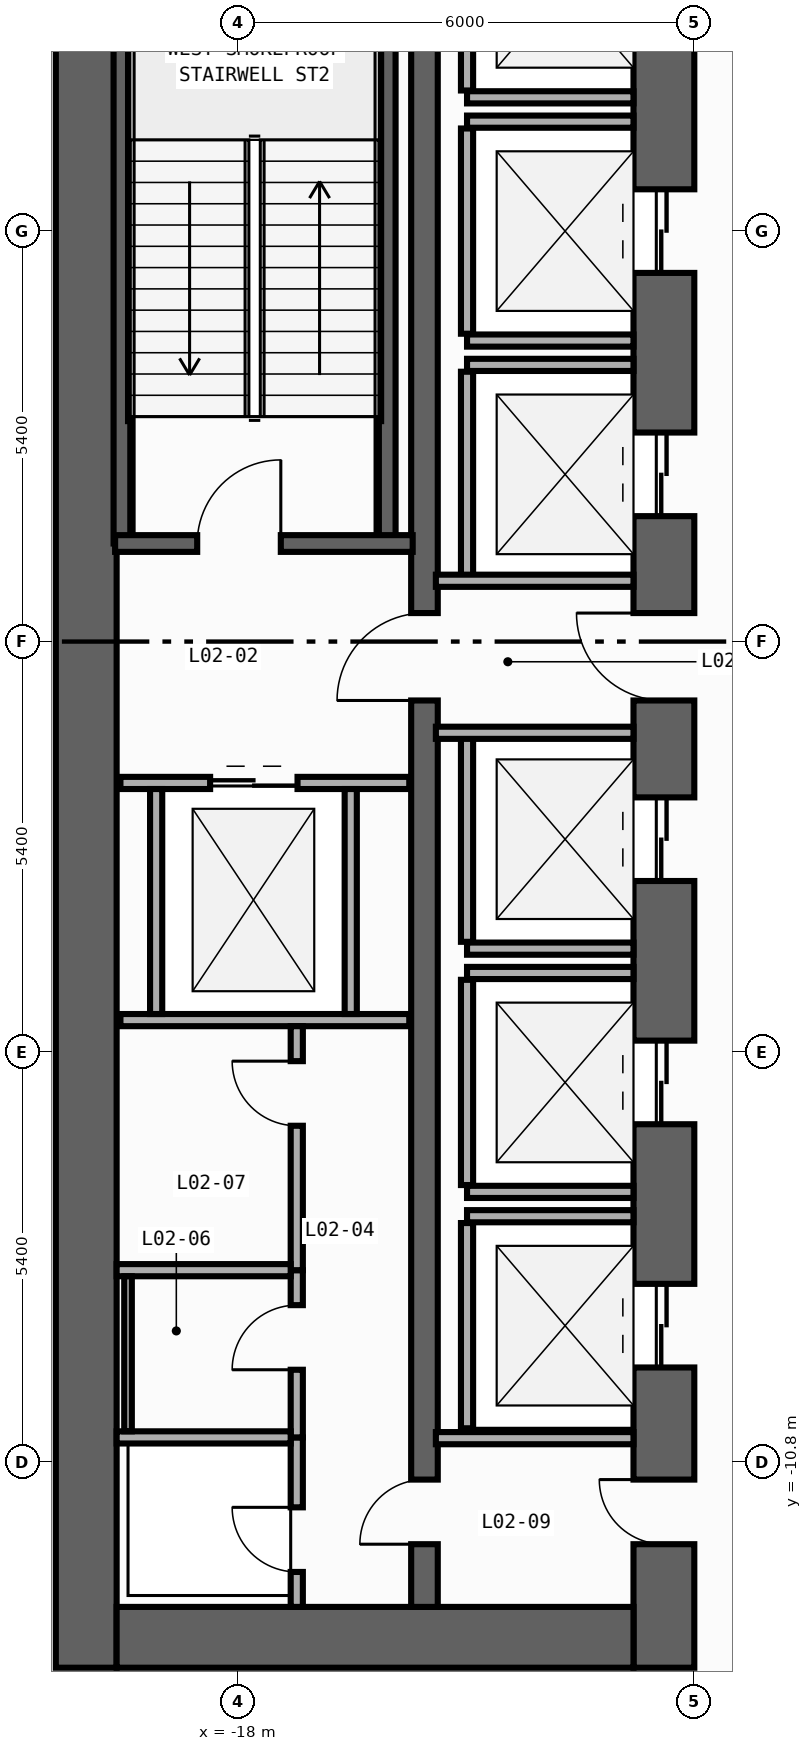
"""IFC4 building model, lengths in metres.
Left out: names, types, materials, properties, quantities, classifications, styles, units other than length and angle.
Written with IfcOpenShell. Run it as: python <this file> out.ifc"""

import sys

from ifc_helpers import new_model, si_unit, direction, frame, frame_2d, origin, place, context, subcontext, project, spatial, rectangle, extrude, element, fill, save


model = new_model("IFC4")
c1 = context("Model", 3, precision=1e-05, world=origin(), true_north=direction((0.0, 1.0)))
c2 = subcontext(c1, "Body", "Model", "MODEL_VIEW")
j1 = project(units=[si_unit("LENGTHUNIT", "METRE"), si_unit("PLANEANGLEUNIT", "RADIAN")], contexts=[c1])
p1 = place(None, origin())
s1 = spatial("IfcSite", under=j1, at=p1, CompositionType="ELEMENT")
p2 = place(p1, origin())
s2 = spatial("IfcBuilding", under=s1, at=p2, CompositionType="ELEMENT")
p3 = place(p2, frame((0.0, 0.0, 6.0)))
s3 = spatial("IfcBuildingStorey", under=s2, at=p3, CompositionType="ELEMENT", Elevation=6.0)
p4 = place(p3, frame((-20.0, -13.5, 0.0), z_axis=(0.0, 0.0, 1.0), x_axis=(0.0, 1.0, 0.0)))
e1 = element("IfcWall", 1, at=p4, inside=s3, PredefinedType="SHEAR", context=c2, shape_type="SweptSolid", body=[
    extrude(rectangle(XDim=27.0, YDim=0.8, at=frame_2d((13.5, 0.0))), origin(), (0.0, 0.0, 1.0), 4.7),
])
p5 = place(p3, frame((-12.4, -13.5, 0.0), z_axis=(0.0, 0.0, 1.0), x_axis=(0.0, 1.0, 0.0)))
e2 = element("IfcWall", 2, at=p5, inside=s3, PredefinedType="SHEAR", context=c2, shape_type="SweptSolid", body=[
    extrude(rectangle(XDim=27.0, YDim=0.8, at=frame_2d((13.5, 0.0))), origin(), (0.0, 0.0, 1.0), 4.7),
])
p6 = place(p5, frame((21.55, 0.0, 0.0)))
e3 = element("IfcOpeningElement", 3, at=p6, cuts=e2, PredefinedType="OPENING", context=c2, shape_type="SweptSolid", body=[
    extrude(rectangle(XDim=1.1, YDim=2.2, at=frame_2d((0.55, 1.1))), frame((0.0, 0.41, 0.0), z_axis=(0.0, -1.0, 0.0), x_axis=(1.0, 0.0, 0.0)), (0.0, 0.0, 1.0), 0.82),
])
p7 = place(p5, frame((18.35, 0.0, 0.0)))
e4 = element("IfcOpeningElement", 4, at=p7, cuts=e2, PredefinedType="OPENING", context=c2, shape_type="SweptSolid", body=[
    extrude(rectangle(XDim=1.1, YDim=2.2, at=frame_2d((0.55, 1.1))), frame((0.0, 0.41, 0.0), z_axis=(0.0, -1.0, 0.0), x_axis=(1.0, 0.0, 0.0)), (0.0, 0.0, 1.0), 0.82),
])
p8 = place(p5, frame((15.15, 0.0, 0.0)))
e5 = element("IfcOpeningElement", 5, at=p8, cuts=e2, PredefinedType="OPENING", context=c2, shape_type="SweptSolid", body=[
    extrude(rectangle(XDim=1.1, YDim=2.2, at=frame_2d((0.55, 1.1))), frame((0.0, 0.41, 0.0), z_axis=(0.0, -1.0, 0.0), x_axis=(1.0, 0.0, 0.0)), (0.0, 0.0, 1.0), 0.82),
])
p9 = place(p5, frame((10.35, 0.0, 0.0)))
e6 = element("IfcOpeningElement", 6, at=p9, cuts=e2, PredefinedType="OPENING", context=c2, shape_type="SweptSolid", body=[
    extrude(rectangle(XDim=1.1, YDim=2.2, at=frame_2d((0.55, 1.1))), frame((0.0, 0.41, 0.0), z_axis=(0.0, -1.0, 0.0), x_axis=(1.0, 0.0, 0.0)), (0.0, 0.0, 1.0), 0.82),
])
p10 = place(p5, frame((7.15, 0.0, 0.0)))
e7 = element("IfcOpeningElement", 7, at=p10, cuts=e2, PredefinedType="OPENING", context=c2, shape_type="SweptSolid", body=[
    extrude(rectangle(XDim=1.1, YDim=2.2, at=frame_2d((0.55, 1.1))), frame((0.0, 0.41, 0.0), z_axis=(0.0, -1.0, 0.0), x_axis=(1.0, 0.0, 0.0)), (0.0, 0.0, 1.0), 0.82),
])
p11 = place(p5, frame((3.95, 0.0, 0.0)))
e8 = element("IfcOpeningElement", 8, at=p11, cuts=e2, PredefinedType="OPENING", context=c2, shape_type="SweptSolid", body=[
    extrude(rectangle(XDim=1.1, YDim=2.2, at=frame_2d((0.55, 1.1))), frame((0.0, 0.41, 0.0), z_axis=(0.0, -1.0, 0.0), x_axis=(1.0, 0.0, 0.0)), (0.0, 0.0, 1.0), 0.82),
])
p12 = place(p5, frame((12.725, 0.0, 0.0)))
e9 = element("IfcOpeningElement", 9, at=p12, cuts=e2, PredefinedType="OPENING", context=c2, shape_type="SweptSolid", body=[
    extrude(rectangle(XDim=1.15, YDim=2.2, at=frame_2d((0.575, 1.1))), frame((0.0, 0.41, 0.0), z_axis=(0.0, -1.0, 0.0), x_axis=(1.0, 0.0, 0.0)), (0.0, 0.0, 1.0), 0.82),
])
p13 = place(p5, frame((1.625, 0.0, 0.0)))
e10 = element("IfcOpeningElement", 10, at=p13, cuts=e2, PredefinedType="OPENING", context=c2, shape_type="SweptSolid", body=[
    extrude(rectangle(XDim=0.85, YDim=2.1, at=frame_2d((0.425, 1.05))), frame((0.0, 0.41, 0.0), z_axis=(0.0, -1.0, 0.0), x_axis=(1.0, 0.0, 0.0)), (0.0, 0.0, 1.0), 0.82),
])
p14 = place(p3, frame((-19.6, -13.1, 0.0), z_axis=(0.0, 0.0, 1.0), x_axis=(1.0, 0.0, 0.0)))
e11 = element("IfcWall", 11, at=p14, inside=s3, PredefinedType="SHEAR", context=c2, shape_type="SweptSolid", body=[
    extrude(rectangle(XDim=6.8, YDim=0.8, at=frame_2d((3.4, 0.0))), origin(), (0.0, 0.0, 1.0), 4.7),
])
p15 = place(p3, frame((-15.55, -12.7, 0.0), z_axis=(0.0, 0.0, 1.0), x_axis=(0.0, 1.0, 0.0)))
e12 = element("IfcWall", 12, at=p15, inside=s3, PredefinedType="SHEAR", context=c2, shape_type="SweptSolid", body=[
    extrude(rectangle(XDim=25.4, YDim=0.35, at=frame_2d((12.7, 0.0))), origin(), (0.0, 0.0, 1.0), 4.7),
])
p16 = place(p15, frame((11.925, 0.0, 0.0)))
e13 = element("IfcOpeningElement", 13, at=p16, cuts=e12, PredefinedType="OPENING", context=c2, shape_type="SweptSolid", body=[
    extrude(rectangle(XDim=1.15, YDim=2.2, at=frame_2d((0.575, 1.1))), frame((0.0, 0.185, 0.0), z_axis=(0.0, -1.0, 0.0), x_axis=(1.0, 0.0, 0.0)), (0.0, 0.0, 1.0), 0.37),
])
p17 = place(p15, frame((0.825, 0.0, 0.0)))
e14 = element("IfcOpeningElement", 14, at=p17, cuts=e12, PredefinedType="OPENING", context=c2, shape_type="SweptSolid", body=[
    extrude(rectangle(XDim=0.85, YDim=2.1, at=frame_2d((0.425, 1.05))), frame((0.0, 0.185, 0.0), z_axis=(0.0, -1.0, 0.0), x_axis=(1.0, 0.0, 0.0)), (0.0, 0.0, 1.0), 0.37),
])
for number, where, z_axis, x_axis in (
    (15, (-16.04, 1.29, 0.0), (0.0, 0.0, 1.0), (0.0, 1.0, 0.0)),
    (16, (-19.53, 1.29, 0.0), (0.0, 0.0, 1.0), (0.0, 1.0, 0.0)),
):
    element("IfcWall", number, at=place(p3, frame(where, z_axis=z_axis, x_axis=x_axis)), inside=s3, PredefinedType="SHEAR", context=c2, shape_type="SweptSolid", body=[
        extrude(rectangle(XDim=11.3, YDim=0.22, at=frame_2d((5.65, 0.0))), origin(), (0.0, 0.0, 1.0), 4.7),
    ])
p18 = place(p3, frame((-19.62, 1.29, 0.0), z_axis=(0.0, 0.0, 1.0), x_axis=(1.0, 0.0, 0.0)))
e17 = element("IfcWall", 17, at=p18, inside=s3, PredefinedType="SHEAR", context=c2, shape_type="SweptSolid", body=[
    extrude(rectangle(XDim=3.915, YDim=0.22, at=frame_2d((1.958, 0.0))), origin(), (0.0, 0.0, 1.0), 4.7),
])
p19 = place(p18, frame((1.08, 0.0, 0.0)))
e18 = element("IfcOpeningElement", 18, at=p19, cuts=e17, PredefinedType="OPENING", context=c2, shape_type="SweptSolid", body=[
    extrude(rectangle(XDim=1.1, YDim=2.2, at=frame_2d((0.55, 1.1))), frame((0.0, 0.12, 0.0), z_axis=(0.0, -1.0, 0.0), x_axis=(1.0, 0.0, 0.0)), (0.0, 0.0, 1.0), 0.24),
])
p20 = place(p3, frame((-14.99, 7.16, 0.0), z_axis=(0.0, 0.0, 1.0), x_axis=(1.0, 0.0, 0.0)))
e19 = element("IfcWall", 19, at=p20, inside=s3, PredefinedType="STANDARD", context=c2, shape_type="SweptSolid", body=[
    extrude(rectangle(XDim=2.19, YDim=0.16, at=frame_2d((1.095, 0.0))), origin(), (0.0, 0.0, 1.0), 4.7),
])
p21 = place(p3, frame((-14.99, 7.25, 0.0), z_axis=(0.0, 0.0, 1.0), x_axis=(0.0, 1.0, 0.0)))
e20 = element("IfcWall", 20, at=p21, inside=s3, PredefinedType="STANDARD", context=c2, shape_type="SweptSolid", body=[
    extrude(rectangle(XDim=2.7, YDim=0.16, at=frame_2d((1.35, 0.0))), origin(), (0.0, 0.0, 1.0), 4.7),
])
for number, where, z_axis, x_axis in (
    (21, (-14.99, 3.96, 0.0), (0.0, 0.0, 1.0), (1.0, 0.0, 0.0)),
    (22, (-14.99, 6.84, 0.0), (0.0, 0.0, 1.0), (1.0, 0.0, 0.0)),
):
    element("IfcWall", number, at=place(p3, frame(where, z_axis=z_axis, x_axis=x_axis)), inside=s3, PredefinedType="STANDARD", context=c2, shape_type="SweptSolid", body=[
        extrude(rectangle(XDim=2.19, YDim=0.16, at=frame_2d((1.095, 0.0))), origin(), (0.0, 0.0, 1.0), 4.7),
    ])
p22 = place(p3, frame((-14.99, 4.05, 0.0), z_axis=(0.0, 0.0, 1.0), x_axis=(0.0, 1.0, 0.0)))
e23 = element("IfcWall", 23, at=p22, inside=s3, PredefinedType="STANDARD", context=c2, shape_type="SweptSolid", body=[
    extrude(rectangle(XDim=2.7, YDim=0.16, at=frame_2d((1.35, 0.0))), origin(), (0.0, 0.0, 1.0), 4.7),
])
p23 = place(p3, frame((-14.99, 3.64, 0.0), z_axis=(0.0, 0.0, 1.0), x_axis=(1.0, 0.0, 0.0)))
e24 = element("IfcWall", 24, at=p23, inside=s3, PredefinedType="STANDARD", context=c2, shape_type="SweptSolid", body=[
    extrude(rectangle(XDim=2.19, YDim=0.16, at=frame_2d((1.095, 0.0))), origin(), (0.0, 0.0, 1.0), 4.7),
])
p24 = place(p3, frame((-14.99, 0.85, 0.0), z_axis=(0.0, 0.0, 1.0), x_axis=(0.0, 1.0, 0.0)))
e25 = element("IfcWall", 25, at=p24, inside=s3, PredefinedType="STANDARD", context=c2, shape_type="SweptSolid", body=[
    extrude(rectangle(XDim=2.7, YDim=0.16, at=frame_2d((1.35, 0.0))), origin(), (0.0, 0.0, 1.0), 4.7),
])
p25 = place(p3, frame((-14.99, -4.04, 0.0), z_axis=(0.0, 0.0, 1.0), x_axis=(1.0, 0.0, 0.0)))
e26 = element("IfcWall", 26, at=p25, inside=s3, PredefinedType="STANDARD", context=c2, shape_type="SweptSolid", body=[
    extrude(rectangle(XDim=2.19, YDim=0.16, at=frame_2d((1.095, 0.0))), origin(), (0.0, 0.0, 1.0), 4.7),
])
p26 = place(p3, frame((-14.99, -3.95, 0.0), z_axis=(0.0, 0.0, 1.0), x_axis=(0.0, 1.0, 0.0)))
e27 = element("IfcWall", 27, at=p26, inside=s3, PredefinedType="STANDARD", context=c2, shape_type="SweptSolid", body=[
    extrude(rectangle(XDim=2.7, YDim=0.16, at=frame_2d((1.35, 0.0))), origin(), (0.0, 0.0, 1.0), 4.7),
])
for number, where, z_axis, x_axis in (
    (28, (-14.99, -7.24, 0.0), (0.0, 0.0, 1.0), (1.0, 0.0, 0.0)),
    (29, (-14.99, -4.36, 0.0), (0.0, 0.0, 1.0), (1.0, 0.0, 0.0)),
):
    element("IfcWall", number, at=place(p3, frame(where, z_axis=z_axis, x_axis=x_axis)), inside=s3, PredefinedType="STANDARD", context=c2, shape_type="SweptSolid", body=[
        extrude(rectangle(XDim=2.19, YDim=0.16, at=frame_2d((1.095, 0.0))), origin(), (0.0, 0.0, 1.0), 4.7),
    ])
p27 = place(p3, frame((-14.99, -7.15, 0.0), z_axis=(0.0, 0.0, 1.0), x_axis=(0.0, 1.0, 0.0)))
e30 = element("IfcWall", 30, at=p27, inside=s3, PredefinedType="STANDARD", context=c2, shape_type="SweptSolid", body=[
    extrude(rectangle(XDim=2.7, YDim=0.16, at=frame_2d((1.35, 0.0))), origin(), (0.0, 0.0, 1.0), 4.7),
])
p28 = place(p3, frame((-14.99, -7.56, 0.0), z_axis=(0.0, 0.0, 1.0), x_axis=(1.0, 0.0, 0.0)))
e31 = element("IfcWall", 31, at=p28, inside=s3, PredefinedType="STANDARD", context=c2, shape_type="SweptSolid", body=[
    extrude(rectangle(XDim=2.19, YDim=0.16, at=frame_2d((1.095, 0.0))), origin(), (0.0, 0.0, 1.0), 4.7),
])
p29 = place(p3, frame((-14.99, -10.35, 0.0), z_axis=(0.0, 0.0, 1.0), x_axis=(0.0, 1.0, 0.0)))
e32 = element("IfcWall", 32, at=p29, inside=s3, PredefinedType="STANDARD", context=c2, shape_type="SweptSolid", body=[
    extrude(rectangle(XDim=2.7, YDim=0.16, at=frame_2d((1.35, 0.0))), origin(), (0.0, 0.0, 1.0), 4.7),
])
p30 = place(p3, frame((-19.55, -1.86, 0.0), z_axis=(0.0, 0.0, 1.0), x_axis=(1.0, 0.0, 0.0)))
e33 = element("IfcWall", 33, at=p30, inside=s3, PredefinedType="STANDARD", context=c2, shape_type="SweptSolid", body=[
    extrude(rectangle(XDim=3.8, YDim=0.16, at=frame_2d((1.9, 0.0))), origin(), (0.0, 0.0, 1.0), 4.7),
])
p31 = place(p30, frame((1.18, 0.0, 0.0)))
e34 = element("IfcOpeningElement", 34, at=p31, cuts=e33, PredefinedType="OPENING", context=c2, shape_type="SweptSolid", body=[
    extrude(rectangle(XDim=1.15, YDim=2.2, at=frame_2d((0.575, 1.1))), frame((0.0, 0.09, 0.0), z_axis=(0.0, -1.0, 0.0), x_axis=(1.0, 0.0, 0.0)), (0.0, 0.0, 1.0), 0.18),
])
p32 = place(p3, frame((-19.55, -4.98, 0.0), z_axis=(0.0, 0.0, 1.0), x_axis=(1.0, 0.0, 0.0)))
e35 = element("IfcWall", 35, at=p32, inside=s3, PredefinedType="STANDARD", context=c2, shape_type="SweptSolid", body=[
    extrude(rectangle(XDim=3.8, YDim=0.16, at=frame_2d((1.9, 0.0))), origin(), (0.0, 0.0, 1.0), 4.7),
])
for number, where, z_axis, x_axis in (
    (36, (-19.08, -4.9, 0.0), (0.0, 0.0, 1.0), (0.0, 1.0, 0.0)),
    (37, (-16.52, -4.9, 0.0), (0.0, 0.0, 1.0), (0.0, 1.0, 0.0)),
):
    element("IfcWall", number, at=place(p3, frame(where, z_axis=z_axis, x_axis=x_axis)), inside=s3, PredefinedType="STANDARD", context=c2, shape_type="SweptSolid", body=[
        extrude(rectangle(XDim=2.96, YDim=0.16, at=frame_2d((1.48, 0.0))), origin(), (0.0, 0.0, 1.0), 4.7),
    ])
for number, where, z_axis, x_axis in (
    (38, (-15.4, 0.8, 0.0), (0.0, 0.0, 1.0), (1.0, 0.0, 0.0)),
    (39, (-15.4, -1.2, 0.0), (0.0, 0.0, 1.0), (1.0, 0.0, 0.0)),
    (40, (-15.4, -10.48, 0.0), (0.0, 0.0, 1.0), (1.0, 0.0, 0.0)),
):
    element("IfcWall", number, at=place(p3, frame(where, z_axis=z_axis, x_axis=x_axis)), inside=s3, PredefinedType="STANDARD", context=c2, shape_type="SweptSolid", body=[
        extrude(rectangle(XDim=2.6, YDim=0.16, at=frame_2d((1.3, 0.0))), origin(), (0.0, 0.0, 1.0), 4.7),
    ])
p33 = place(p3, frame((-17.23, -12.7, 0.0), z_axis=(0.0, 0.0, 1.0), x_axis=(0.0, 1.0, 0.0)))
e41 = element("IfcWall", 41, at=p33, inside=s3, PredefinedType="PARTITIONING", context=c2, shape_type="SweptSolid", body=[
    extrude(rectangle(XDim=2.23, YDim=0.16, at=frame_2d((1.115, 0.0))), origin(), (0.0, 0.0, 1.0), 4.7),
])
p34 = place(p33, frame((0.46, 0.0, 0.0)))
e42 = element("IfcOpeningElement", 42, at=p34, cuts=e41, PredefinedType="OPENING", context=c2, shape_type="SweptSolid", body=[
    extrude(rectangle(XDim=0.85, YDim=2.1, at=frame_2d((0.425, 1.05))), frame((0.0, 0.09, 0.0), z_axis=(0.0, -1.0, 0.0), x_axis=(1.0, 0.0, 0.0)), (0.0, 0.0, 1.0), 0.18),
])
p35 = place(p3, frame((-17.23, -10.47, 0.0), z_axis=(0.0, 0.0, 1.0), x_axis=(0.0, 1.0, 0.0)))
e43 = element("IfcWall", 43, at=p35, inside=s3, PredefinedType="PARTITIONING", context=c2, shape_type="SweptSolid", body=[
    extrude(rectangle(XDim=2.2, YDim=0.16, at=frame_2d((1.1, 0.0))), origin(), (0.0, 0.0, 1.0), 4.7),
])
p36 = place(p35, frame((0.89, 0.0, 0.0)))
e44 = element("IfcOpeningElement", 44, at=p36, cuts=e43, PredefinedType="OPENING", context=c2, shape_type="SweptSolid", body=[
    extrude(rectangle(XDim=0.85, YDim=2.1, at=frame_2d((0.425, 1.05))), frame((0.0, 0.09, 0.0), z_axis=(0.0, -1.0, 0.0), x_axis=(1.0, 0.0, 0.0)), (0.0, 0.0, 1.0), 0.18),
])
p37 = place(p3, frame((-17.23, -8.27, 0.0), z_axis=(0.0, 0.0, 1.0), x_axis=(0.0, 1.0, 0.0)))
e45 = element("IfcWall", 45, at=p37, inside=s3, PredefinedType="PARTITIONING", context=c2, shape_type="SweptSolid", body=[
    extrude(rectangle(XDim=3.21, YDim=0.16, at=frame_2d((1.605, 0.0))), origin(), (0.0, 0.0, 1.0), 4.7),
])
p38 = place(p37, frame((1.9, 0.0, 0.0)))
e46 = element("IfcOpeningElement", 46, at=p38, cuts=e45, PredefinedType="OPENING", context=c2, shape_type="SweptSolid", body=[
    extrude(rectangle(XDim=0.85, YDim=2.1, at=frame_2d((0.425, 1.05))), frame((0.0, 0.09, 0.0), z_axis=(0.0, -1.0, 0.0), x_axis=(1.0, 0.0, 0.0)), (0.0, 0.0, 1.0), 0.18),
])
for number, where, z_axis, x_axis in (
    (47, (-19.6, -10.47, 0.0), (0.0, 0.0, 1.0), (1.0, 0.0, 0.0)),
    (48, (-19.6, -8.27, 0.0), (0.0, 0.0, 1.0), (1.0, 0.0, 0.0)),
):
    element("IfcWall", number, at=place(p3, frame(where, z_axis=z_axis, x_axis=x_axis)), inside=s3, PredefinedType="PARTITIONING", context=c2, shape_type="SweptSolid", body=[
        extrude(rectangle(XDim=2.29, YDim=0.16, at=frame_2d((1.145, 0.0))), origin(), (0.0, 0.0, 1.0), 4.7),
    ])
p39 = place(p3, frame((-19.45, -10.39, 0.0), z_axis=(0.0, 0.0, 1.0), x_axis=(0.0, 1.0, 0.0)))
e49 = element("IfcWall", 49, at=p39, inside=s3, PredefinedType="PARTITIONING", context=c2, shape_type="SweptSolid", body=[
    extrude(rectangle(XDim=2.04, YDim=0.1, at=frame_2d((1.02, 0.0))), origin(), (0.0, 0.0, 1.0), 4.7),
])
p40 = place(p19, origin())
e50 = element("IfcDoor", 50, at=p40, inside=s3, OperationType="SINGLE_SWING_RIGHT", PredefinedType="DOOR", context=c2, shape_type="SweptSolid", body=[
    extrude(rectangle(XDim=1.1, YDim=2.2, at=frame_2d((0.55, 1.1))), frame((0.0, 0.025, 0.0), z_axis=(0.0, -1.0, 0.0), x_axis=(1.0, 0.0, 0.0)), (0.0, 0.0, 1.0), 0.05),
])
fill(e18, e50)
p41 = place(p7, origin())
e51 = element("IfcDoor", 51, at=p41, inside=s3, OperationType="DOUBLE_DOOR_SLIDING", PredefinedType="DOOR", context=c2, shape_type="SweptSolid", body=[
    extrude(rectangle(XDim=1.1, YDim=2.2, at=frame_2d((0.55, 1.1))), frame((0.0, 0.025, 0.0), z_axis=(0.0, -1.0, 0.0), x_axis=(1.0, 0.0, 0.0)), (0.0, 0.0, 1.0), 0.05),
])
fill(e4, e51)
p42 = place(p8, origin())
e52 = element("IfcDoor", 52, at=p42, inside=s3, OperationType="DOUBLE_DOOR_SLIDING", PredefinedType="DOOR", context=c2, shape_type="SweptSolid", body=[
    extrude(rectangle(XDim=1.1, YDim=2.2, at=frame_2d((0.55, 1.1))), frame((0.0, 0.025, 0.0), z_axis=(0.0, -1.0, 0.0), x_axis=(1.0, 0.0, 0.0)), (0.0, 0.0, 1.0), 0.05),
])
fill(e5, e52)
p43 = place(p9, origin())
e53 = element("IfcDoor", 53, at=p43, inside=s3, OperationType="DOUBLE_DOOR_SLIDING", PredefinedType="DOOR", context=c2, shape_type="SweptSolid", body=[
    extrude(rectangle(XDim=1.1, YDim=2.2, at=frame_2d((0.55, 1.1))), frame((0.0, 0.025, 0.0), z_axis=(0.0, -1.0, 0.0), x_axis=(1.0, 0.0, 0.0)), (0.0, 0.0, 1.0), 0.05),
])
fill(e6, e53)
p44 = place(p10, origin())
e54 = element("IfcDoor", 54, at=p44, inside=s3, OperationType="DOUBLE_DOOR_SLIDING", PredefinedType="DOOR", context=c2, shape_type="SweptSolid", body=[
    extrude(rectangle(XDim=1.1, YDim=2.2, at=frame_2d((0.55, 1.1))), frame((0.0, 0.025, 0.0), z_axis=(0.0, -1.0, 0.0), x_axis=(1.0, 0.0, 0.0)), (0.0, 0.0, 1.0), 0.05),
])
fill(e7, e54)
p45 = place(p11, origin())
e55 = element("IfcDoor", 55, at=p45, inside=s3, OperationType="DOUBLE_DOOR_SLIDING", PredefinedType="DOOR", context=c2, shape_type="SweptSolid", body=[
    extrude(rectangle(XDim=1.1, YDim=2.2, at=frame_2d((0.55, 1.1))), frame((0.0, 0.025, 0.0), z_axis=(0.0, -1.0, 0.0), x_axis=(1.0, 0.0, 0.0)), (0.0, 0.0, 1.0), 0.05),
])
fill(e8, e55)
p46 = place(p12, origin())
e56 = element("IfcDoor", 56, at=p46, inside=s3, OperationType="SINGLE_SWING_RIGHT", PredefinedType="DOOR", context=c2, shape_type="SweptSolid", body=[
    extrude(rectangle(XDim=1.15, YDim=2.2, at=frame_2d((0.575, 1.1))), frame((0.0, 0.025, 0.0), z_axis=(0.0, -1.0, 0.0), x_axis=(1.0, 0.0, 0.0)), (0.0, 0.0, 1.0), 0.05),
])
fill(e9, e56)
p47 = place(p16, origin())
e57 = element("IfcDoor", 57, at=p47, inside=s3, OperationType="SINGLE_SWING_LEFT", PredefinedType="DOOR", context=c2, shape_type="SweptSolid", body=[
    extrude(rectangle(XDim=1.15, YDim=2.2, at=frame_2d((0.575, 1.1))), frame((0.0, 0.025, 0.0), z_axis=(0.0, -1.0, 0.0), x_axis=(1.0, 0.0, 0.0)), (0.0, 0.0, 1.0), 0.05),
])
fill(e13, e57)
p48 = place(p13, origin())
e58 = element("IfcDoor", 58, at=p48, inside=s3, OperationType="SINGLE_SWING_RIGHT", PredefinedType="DOOR", context=c2, shape_type="SweptSolid", body=[
    extrude(rectangle(XDim=0.85, YDim=2.1, at=frame_2d((0.425, 1.05))), frame((0.0, 0.025, 0.0), z_axis=(0.0, -1.0, 0.0), x_axis=(1.0, 0.0, 0.0)), (0.0, 0.0, 1.0), 0.05),
])
fill(e10, e58)
p49 = place(p17, origin())
e59 = element("IfcDoor", 59, at=p49, inside=s3, OperationType="SINGLE_SWING_LEFT", PredefinedType="DOOR", context=c2, shape_type="SweptSolid", body=[
    extrude(rectangle(XDim=0.85, YDim=2.1, at=frame_2d((0.425, 1.05))), frame((0.0, 0.025, 0.0), z_axis=(0.0, -1.0, 0.0), x_axis=(1.0, 0.0, 0.0)), (0.0, 0.0, 1.0), 0.05),
])
fill(e14, e59)
p50 = place(p31, origin())
e60 = element("IfcDoor", 60, at=p50, inside=s3, OperationType="DOUBLE_DOOR_SLIDING", PredefinedType="DOOR", context=c2, shape_type="SweptSolid", body=[
    extrude(rectangle(XDim=1.15, YDim=2.2, at=frame_2d((0.575, 1.1))), frame((0.0, 0.025, 0.0), z_axis=(0.0, -1.0, 0.0), x_axis=(1.0, 0.0, 0.0)), (0.0, 0.0, 1.0), 0.05),
])
fill(e34, e60)
p51 = place(p34, origin())
e61 = element("IfcDoor", 61, at=p51, inside=s3, OperationType="SINGLE_SWING_RIGHT", PredefinedType="DOOR", context=c2, shape_type="SweptSolid", body=[
    extrude(rectangle(XDim=0.85, YDim=2.1, at=frame_2d((0.425, 1.05))), frame((0.0, 0.025, 0.0), z_axis=(0.0, -1.0, 0.0), x_axis=(1.0, 0.0, 0.0)), (0.0, 0.0, 1.0), 0.05),
])
fill(e42, e61)
p52 = place(p36, origin())
e62 = element("IfcDoor", 62, at=p52, inside=s3, OperationType="SINGLE_SWING_LEFT", PredefinedType="DOOR", context=c2, shape_type="SweptSolid", body=[
    extrude(rectangle(XDim=0.85, YDim=2.1, at=frame_2d((0.425, 1.05))), frame((0.0, 0.025, 0.0), z_axis=(0.0, -1.0, 0.0), x_axis=(1.0, 0.0, 0.0)), (0.0, 0.0, 1.0), 0.05),
])
fill(e44, e62)
p53 = place(p38, origin())
e63 = element("IfcDoor", 63, at=p53, inside=s3, OperationType="SINGLE_SWING_RIGHT", PredefinedType="DOOR", context=c2, shape_type="SweptSolid", body=[
    extrude(rectangle(XDim=0.85, YDim=2.1, at=frame_2d((0.425, 1.05))), frame((0.0, 0.025, 0.0), z_axis=(0.0, -1.0, 0.0), x_axis=(1.0, 0.0, 0.0)), (0.0, 0.0, 1.0), 0.05),
])
fill(e46, e63)
save(model, sys.argv[1])
